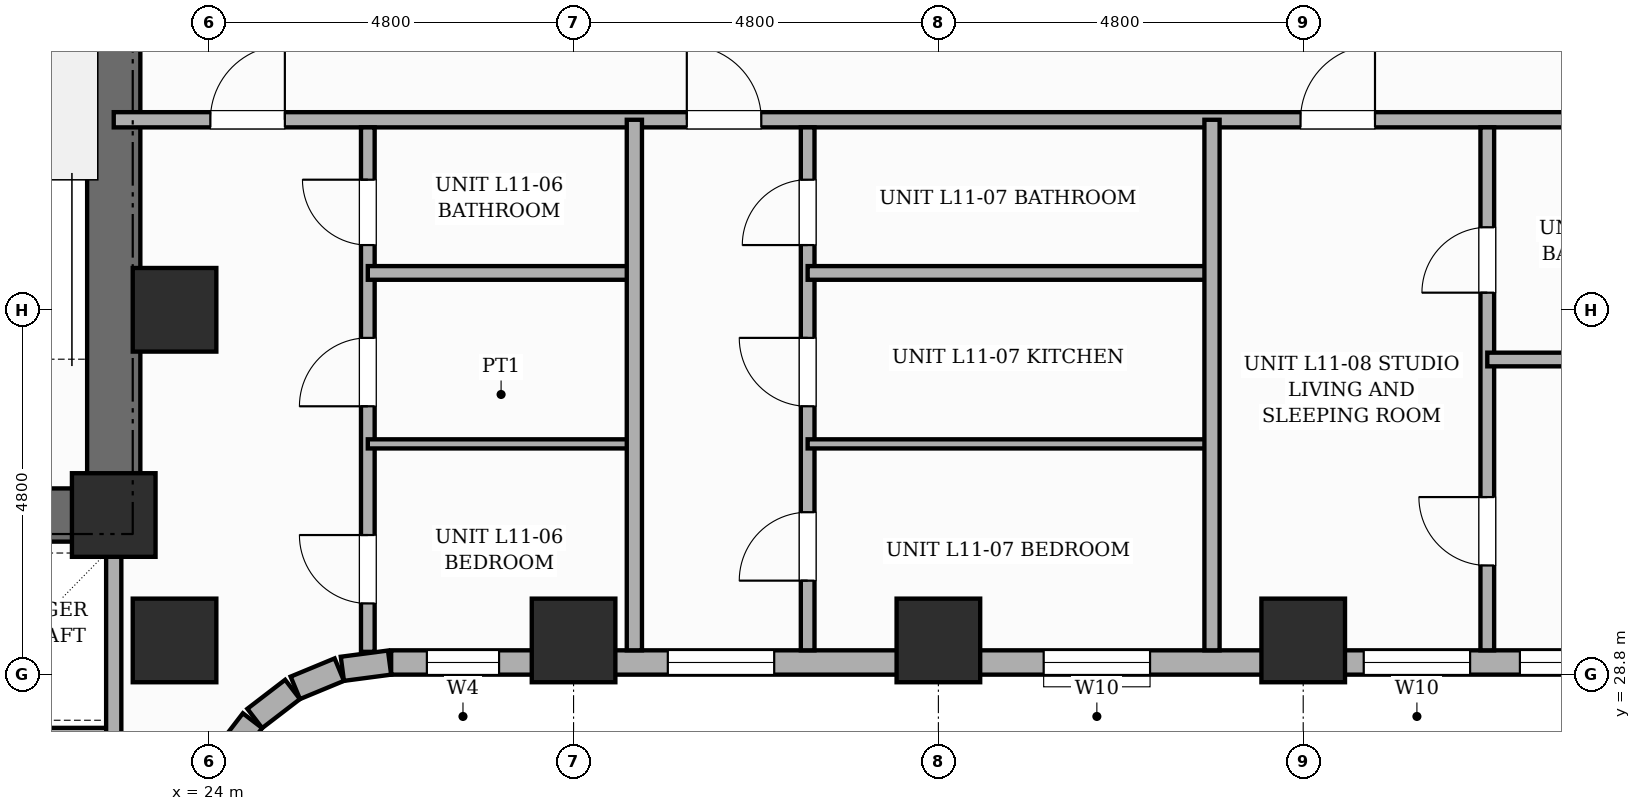
"""IFC4 building model, lengths in metres.
Left out: names, types, materials, properties, quantities, classifications, styles, units other than length and angle.
Written with IfcOpenShell. Run it as: python <this file> out.ifc"""

import sys

from ifc_helpers import new_model, si_unit, direction, frame, frame_2d, origin, origin_2d, place, context, subcontext, project, spatial, rectangle, extrude, element, fill, save


model = new_model("IFC4")
c1 = context("Model", 3, precision=1e-05, world=origin(), true_north=direction((0.0, 1.0)))
c2 = subcontext(c1, "Body", "Model", "MODEL_VIEW")
j1 = project(units=[si_unit("LENGTHUNIT", "METRE"), si_unit("PLANEANGLEUNIT", "RADIAN")], contexts=[c1])
p1 = place(None, origin())
s1 = spatial("IfcSite", under=j1, at=p1, CompositionType="ELEMENT")
p2 = place(p1, origin())
s2 = spatial("IfcBuilding", under=s1, at=p2, CompositionType="ELEMENT")
p3 = place(p2, frame((0.0, 0.0, 46.6)))
s3 = spatial("IfcBuildingStorey", under=s2, at=p3, CompositionType="ELEMENT", Elevation=46.6)
p4 = place(p3, frame((22.75, 30.55, 0.0), z_axis=(0.0, 0.0, 1.0), x_axis=(0.0, 1.0, 0.0)))
e1 = element("IfcWall", 1, at=p4, inside=s3, PredefinedType="SHEAR", context=c2, shape_type="SweptSolid", body=[
    extrude(rectangle(XDim=15.6, YDim=0.7, at=frame_2d((7.8, 0.0))), origin(), (0.0, 0.0, 1.0), 3.6),
])
p5 = place(p4, frame((10.8, 0.0, 0.0)))
e2 = element("IfcOpeningElement", 2, at=p5, cuts=e1, PredefinedType="OPENING", context=c2, shape_type="SweptSolid", body=[
    extrude(rectangle(XDim=1.0, YDim=2.15, at=frame_2d((0.5, 1.075))), frame((0.0, 0.36, 0.0), z_axis=(0.0, -1.0, 0.0), x_axis=(1.0, 0.0, 0.0)), (0.0, 0.0, 1.0), 0.72),
])
p6 = place(p3, frame((18.84, 30.9, 0.0), z_axis=(0.0, 0.0, 1.0), x_axis=(1.0, 0.0, 0.0)))
e3 = element("IfcWall", 3, at=p6, inside=s3, PredefinedType="SHEAR", context=c2, shape_type="SweptSolid", body=[
    extrude(rectangle(XDim=3.91, YDim=0.7, at=frame_2d((1.955, 0.0))), origin(), (0.0, 0.0, 1.0), 3.6),
])
for number, where, z_axis, x_axis in (
    (4, (22.75, 30.9, 0.0), (0.0, 0.0, 1.0), (1.0, 0.0, 0.0)),
    (5, (23.55, 29.25, 0.0), (0.0, 0.0, 1.0), (1.0, 0.0, 0.0)),
    (6, (23.55, 33.6, 0.0), (0.0, 0.0, 1.0), (1.0, 0.0, 0.0)),
    (7, (28.8, 29.25, 0.0), (0.0, 0.0, 1.0), (1.0, 0.0, 0.0)),
    (8, (33.6, 29.25, 0.0), (0.0, 0.0, 1.0), (1.0, 0.0, 0.0)),
    (9, (38.4, 29.25, 0.0), (0.0, 0.0, 1.0), (1.0, 0.0, 0.0)),
):
    element("IfcColumn", number, at=place(p3, frame(where, z_axis=z_axis, x_axis=x_axis)), inside=s3, PredefinedType="COLUMN", context=c2, shape_type="SweptSolid", body=[
        extrude(rectangle(XDim=1.1, YDim=1.1, at=origin_2d()), origin(), (0.0, 0.0, 1.0), 3.6),
    ])
p7 = place(p3, frame((55.2, 28.96, 0.0), z_axis=(0.0, 0.0, 1.0), x_axis=(-1.0, 0.0, 0.0)))
e10 = element("IfcWall", 10, at=p7, inside=s3, PredefinedType="STANDARD", context=c2, shape_type="SweptSolid", body=[
    extrude(rectangle(XDim=28.8, YDim=0.32, at=frame_2d((14.4, 0.0))), origin(), (0.0, 0.0, 1.0), 2.53),
])
p8 = place(p7, frame((27.38, 0.0, 0.45)))
e11 = element("IfcOpeningElement", 11, at=p8, cuts=e10, PredefinedType="OPENING", context=c2, shape_type="SweptSolid", body=[
    extrude(rectangle(XDim=0.95, YDim=1.8, at=frame_2d((0.475, 0.9))), frame((0.0, 0.17, 0.0), z_axis=(0.0, -1.0, 0.0), x_axis=(1.0, 0.0, 0.0)), (0.0, 0.0, 1.0), 0.34),
])
p9 = place(p7, frame((18.815, 0.0, 0.65)))
e12 = element("IfcOpeningElement", 12, at=p9, cuts=e10, PredefinedType="OPENING", context=c2, shape_type="SweptSolid", body=[
    extrude(rectangle(XDim=1.4, YDim=1.1, at=frame_2d((0.7, 0.55))), frame((0.0, 0.17, 0.0), z_axis=(0.0, -1.0, 0.0), x_axis=(1.0, 0.0, 0.0)), (0.0, 0.0, 1.0), 0.34),
])
p10 = place(p7, frame((14.604, 0.0, 0.65)))
e13 = element("IfcOpeningElement", 13, at=p10, cuts=e10, PredefinedType="OPENING", context=c2, shape_type="SweptSolid", body=[
    extrude(rectangle(XDim=1.4, YDim=1.1, at=frame_2d((0.7, 0.55))), frame((0.0, 0.17, 0.0), z_axis=(0.0, -1.0, 0.0), x_axis=(1.0, 0.0, 0.0)), (0.0, 0.0, 1.0), 0.34),
])
p11 = place(p7, frame((4.79, 0.0, 0.65)))
e14 = element("IfcOpeningElement", 14, at=p11, cuts=e10, PredefinedType="OPENING", context=c2, shape_type="SweptSolid", body=[
    extrude(rectangle(XDim=1.4, YDim=1.1, at=frame_2d((0.7, 0.55))), frame((0.0, 0.17, 0.0), z_axis=(0.0, -1.0, 0.0), x_axis=(1.0, 0.0, 0.0)), (0.0, 0.0, 1.0), 0.34),
])
p12 = place(p7, frame((0.47, 0.0, 0.65)))
e15 = element("IfcOpeningElement", 15, at=p12, cuts=e10, PredefinedType="OPENING", context=c2, shape_type="SweptSolid", body=[
    extrude(rectangle(XDim=1.4, YDim=1.1, at=frame_2d((0.7, 0.55))), frame((0.0, 0.17, 0.0), z_axis=(0.0, -1.0, 0.0), x_axis=(1.0, 0.0, 0.0)), (0.0, 0.0, 1.0), 0.34),
])
p13 = place(p7, frame((23.76, 0.0, 0.65)))
e16 = element("IfcOpeningElement", 16, at=p13, cuts=e10, PredefinedType="OPENING", context=c2, shape_type="SweptSolid", body=[
    extrude(rectangle(XDim=1.4, YDim=1.1, at=frame_2d((0.7, 0.55))), frame((0.0, 0.17, 0.0), z_axis=(0.0, -1.0, 0.0), x_axis=(1.0, 0.0, 0.0)), (0.0, 0.0, 1.0), 0.34),
])
p14 = place(p7, frame((12.999, 0.0, 0.45)))
e17 = element("IfcOpeningElement", 17, at=p14, cuts=e10, PredefinedType="OPENING", context=c2, shape_type="SweptSolid", body=[
    extrude(rectangle(XDim=0.95, YDim=1.8, at=frame_2d((0.475, 0.9))), frame((0.0, 0.17, 0.0), z_axis=(0.0, -1.0, 0.0), x_axis=(1.0, 0.0, 0.0)), (0.0, 0.0, 1.0), 0.34),
])
p15 = place(p3, frame((26.379, 28.958, 0.0), z_axis=(0.0, 0.0, 1.0), x_axis=(-0.991447664465, -0.130504898859, 0.0)))
e18 = element("IfcWall", 18, at=p15, inside=s3, PredefinedType="STANDARD", context=c2, shape_type="SweptSolid", body=[
    extrude(rectangle(XDim=0.627, YDim=0.32, at=frame_2d((0.313, 0.0))), origin(), (0.0, 0.0, 1.0), 2.53),
])
p16 = place(p3, frame((25.718, 28.866, 0.0), z_axis=(0.0, 0.0, 1.0), x_axis=(-0.923836271867, -0.382787856107, 0.0)))
e19 = element("IfcWall", 19, at=p16, inside=s3, PredefinedType="STANDARD", context=c2, shape_type="SweptSolid", body=[
    extrude(rectangle(XDim=0.626, YDim=0.32, at=frame_2d((0.313, 0.0))), origin(), (0.0, 0.0, 1.0), 3.35),
])
for number, where, z_axis, x_axis in (
    (20, (25.103, 28.605, 0.0), (0.0, 0.0, 1.0), (-0.793, -0.609, 0.0)),
    (21, (24.576, 28.195, 0.0), (0.0, 0.0, 1.0), (-0.609, -0.793, 0.0)),
):
    element("IfcWall", number, at=place(p3, frame(where, z_axis=z_axis, x_axis=x_axis)), inside=s3, PredefinedType="STANDARD", context=c2, shape_type="SweptSolid", body=[
        extrude(rectangle(XDim=0.626, YDim=0.32, at=frame_2d((0.313, 0.0))), origin(), (0.0, 0.0, 1.0), 3.35),
    ])
p17 = place(p3, frame((15.5, 28.0, 0.0), z_axis=(0.0, 0.0, 1.0), x_axis=(1.0, 0.0, 0.0)))
e22 = element("IfcWall", 22, at=p17, inside=s3, PredefinedType="POLYGONAL", context=c2, shape_type="SweptSolid", body=[
    extrude(rectangle(XDim=7.25, YDim=0.2, at=frame_2d((3.625, 0.0))), origin(), (0.0, 0.0, 1.0), 3.35),
])
p18 = place(p3, frame((22.75, 27.9, 0.0), z_axis=(0.0, 0.0, 1.0), x_axis=(0.0, 1.0, 0.0)))
e23 = element("IfcWall", 23, at=p18, inside=s3, PredefinedType="POLYGONAL", context=c2, shape_type="SweptSolid", body=[
    extrude(rectangle(XDim=3.0, YDim=0.2, at=frame_2d((1.5, 0.0))), origin(), (0.0, 0.0, 1.0), 3.35),
])
p19 = place(p3, frame((22.75, 36.1, 0.0), z_axis=(0.0, 0.0, 1.0), x_axis=(1.0, 0.0, 0.0)))
e24 = element("IfcWall", 24, at=p19, inside=s3, PredefinedType="PARTITIONING", context=c2, shape_type="SweptSolid", body=[
    extrude(rectangle(XDim=21.27, YDim=0.2, at=frame_2d((10.635, 0.0))), origin(), (0.0, 0.0, 1.0), 3.35),
])
p20 = place(p19, frame((1.271, 0.0, 0.0)))
e25 = element("IfcOpeningElement", 25, at=p20, cuts=e24, PredefinedType="OPENING", context=c2, shape_type="SweptSolid", body=[
    extrude(rectangle(XDim=0.98, YDim=2.18, at=frame_2d((0.49, 1.09))), frame((0.0, 0.11, 0.0), z_axis=(0.0, -1.0, 0.0), x_axis=(1.0, 0.0, 0.0)), (0.0, 0.0, 1.0), 0.22),
])
p21 = place(p19, frame((7.54, 0.0, 0.0)))
e26 = element("IfcOpeningElement", 26, at=p21, cuts=e24, PredefinedType="OPENING", context=c2, shape_type="SweptSolid", body=[
    extrude(rectangle(XDim=0.98, YDim=2.18, at=frame_2d((0.49, 1.09))), frame((0.0, 0.11, 0.0), z_axis=(0.0, -1.0, 0.0), x_axis=(1.0, 0.0, 0.0)), (0.0, 0.0, 1.0), 0.22),
])
p22 = place(p19, frame((15.615, 0.0, 0.0)))
e27 = element("IfcOpeningElement", 27, at=p22, cuts=e24, PredefinedType="OPENING", context=c2, shape_type="SweptSolid", body=[
    extrude(rectangle(XDim=0.98, YDim=2.18, at=frame_2d((0.49, 1.09))), frame((0.0, 0.11, 0.0), z_axis=(0.0, -1.0, 0.0), x_axis=(1.0, 0.0, 0.0)), (0.0, 0.0, 1.0), 0.22),
])
p23 = place(p3, frame((26.093, 29.1, 0.0), z_axis=(0.0, 0.0, 1.0), x_axis=(0.0, 1.0, 0.0)))
e28 = element("IfcWall", 28, at=p23, inside=s3, PredefinedType="PLUMBINGWALL", context=c2, shape_type="SweptSolid", body=[
    extrude(rectangle(XDim=6.9, YDim=0.18, at=frame_2d((3.45, 0.0))), origin(), (0.0, 0.0, 1.0), 3.35),
])
p24 = place(p23, frame((0.637, 0.0, 0.0)))
e29 = element("IfcOpeningElement", 29, at=p24, cuts=e28, PredefinedType="OPENING", context=c2, shape_type="SweptSolid", body=[
    extrude(rectangle(XDim=0.9, YDim=2.15, at=frame_2d((0.45, 1.075))), frame((0.0, 0.1, 0.0), z_axis=(0.0, -1.0, 0.0), x_axis=(1.0, 0.0, 0.0)), (0.0, 0.0, 1.0), 0.2),
])
p25 = place(p23, frame((3.23, 0.0, 0.0)))
e30 = element("IfcOpeningElement", 30, at=p25, cuts=e28, PredefinedType="OPENING", context=c2, shape_type="SweptSolid", body=[
    extrude(rectangle(XDim=0.9, YDim=2.15, at=frame_2d((0.45, 1.075))), frame((0.0, 0.1, 0.0), z_axis=(0.0, -1.0, 0.0), x_axis=(1.0, 0.0, 0.0)), (0.0, 0.0, 1.0), 0.2),
])
p26 = place(p23, frame((5.352, 0.0, 0.0)))
e31 = element("IfcOpeningElement", 31, at=p26, cuts=e28, PredefinedType="OPENING", context=c2, shape_type="SweptSolid", body=[
    extrude(rectangle(XDim=0.86, YDim=2.1, at=frame_2d((0.43, 1.05))), frame((0.0, 0.1, 0.0), z_axis=(0.0, -1.0, 0.0), x_axis=(1.0, 0.0, 0.0)), (0.0, 0.0, 1.0), 0.2),
])
p27 = place(p3, frame((26.093, 31.836, 0.0), z_axis=(0.0, 0.0, 1.0), x_axis=(1.0, 0.0, 0.0)))
e32 = element("IfcWall", 32, at=p27, inside=s3, PredefinedType="PARTITIONING", context=c2, shape_type="SweptSolid", body=[
    extrude(rectangle(XDim=3.507, YDim=0.12, at=frame_2d((1.753, 0.0))), origin(), (0.0, 0.0, 1.0), 3.35),
])
p28 = place(p3, frame((26.093, 34.085, 0.0), z_axis=(0.0, 0.0, 1.0), x_axis=(1.0, 0.0, 0.0)))
e33 = element("IfcWall", 33, at=p28, inside=s3, PredefinedType="PLUMBINGWALL", context=c2, shape_type="SweptSolid", body=[
    extrude(rectangle(XDim=3.507, YDim=0.18, at=frame_2d((1.753, 0.0))), origin(), (0.0, 0.0, 1.0), 3.35),
])
p29 = place(p3, frame((29.6, 29.12, 0.0), z_axis=(0.0, 0.0, 1.0), x_axis=(0.0, 1.0, 0.0)))
e34 = element("IfcWall", 34, at=p29, inside=s3, PredefinedType="SOLIDWALL", context=c2, shape_type="SweptSolid", body=[
    extrude(rectangle(XDim=6.98, YDim=0.2, at=frame_2d((3.49, 0.0))), origin(), (0.0, 0.0, 1.0), 3.35),
])
p30 = place(p3, frame((31.88, 29.12, 0.0), z_axis=(0.0, 0.0, 1.0), x_axis=(0.0, 1.0, 0.0)))
e35 = element("IfcWall", 35, at=p30, inside=s3, PredefinedType="PLUMBINGWALL", context=c2, shape_type="SweptSolid", body=[
    extrude(rectangle(XDim=6.88, YDim=0.18, at=frame_2d((3.44, 0.0))), origin(), (0.0, 0.0, 1.0), 3.35),
])
p31 = place(p30, frame((0.917, 0.0, 0.0)))
e36 = element("IfcOpeningElement", 36, at=p31, cuts=e35, PredefinedType="OPENING", context=c2, shape_type="SweptSolid", body=[
    extrude(rectangle(XDim=0.9, YDim=2.15, at=frame_2d((0.45, 1.075))), frame((0.0, 0.1, 0.0), z_axis=(0.0, -1.0, 0.0), x_axis=(1.0, 0.0, 0.0)), (0.0, 0.0, 1.0), 0.2),
])
p32 = place(p30, frame((3.21, 0.0, 0.0)))
e37 = element("IfcOpeningElement", 37, at=p32, cuts=e35, PredefinedType="OPENING", context=c2, shape_type="SweptSolid", body=[
    extrude(rectangle(XDim=0.9, YDim=2.15, at=frame_2d((0.45, 1.075))), frame((0.0, 0.1, 0.0), z_axis=(0.0, -1.0, 0.0), x_axis=(1.0, 0.0, 0.0)), (0.0, 0.0, 1.0), 0.2),
])
p33 = place(p30, frame((5.332, 0.0, 0.0)))
e38 = element("IfcOpeningElement", 38, at=p33, cuts=e35, PredefinedType="OPENING", context=c2, shape_type="SweptSolid", body=[
    extrude(rectangle(XDim=0.86, YDim=2.1, at=frame_2d((0.43, 1.05))), frame((0.0, 0.1, 0.0), z_axis=(0.0, -1.0, 0.0), x_axis=(1.0, 0.0, 0.0)), (0.0, 0.0, 1.0), 0.2),
])
p34 = place(p3, frame((31.88, 31.836, 0.0), z_axis=(0.0, 0.0, 1.0), x_axis=(1.0, 0.0, 0.0)))
e39 = element("IfcWall", 39, at=p34, inside=s3, PredefinedType="PARTITIONING", context=c2, shape_type="SweptSolid", body=[
    extrude(rectangle(XDim=5.32, YDim=0.12, at=frame_2d((2.66, 0.0))), origin(), (0.0, 0.0, 1.0), 3.35),
])
p35 = place(p3, frame((31.88, 34.085, 0.0), z_axis=(0.0, 0.0, 1.0), x_axis=(1.0, 0.0, 0.0)))
e40 = element("IfcWall", 40, at=p35, inside=s3, PredefinedType="PLUMBINGWALL", context=c2, shape_type="SweptSolid", body=[
    extrude(rectangle(XDim=5.32, YDim=0.18, at=frame_2d((2.66, 0.0))), origin(), (0.0, 0.0, 1.0), 3.35),
])
p36 = place(p3, frame((37.2, 29.12, 0.0), z_axis=(0.0, 0.0, 1.0), x_axis=(0.0, 1.0, 0.0)))
e41 = element("IfcWall", 41, at=p36, inside=s3, PredefinedType="SOLIDWALL", context=c2, shape_type="SweptSolid", body=[
    extrude(rectangle(XDim=6.98, YDim=0.2, at=frame_2d((3.49, 0.0))), origin(), (0.0, 0.0, 1.0), 3.35),
])
p37 = place(p3, frame((40.822, 29.12, 0.0), z_axis=(0.0, 0.0, 1.0), x_axis=(0.0, 1.0, 0.0)))
e42 = element("IfcWall", 42, at=p37, inside=s3, PredefinedType="PLUMBINGWALL", context=c2, shape_type="SweptSolid", body=[
    extrude(rectangle(XDim=6.88, YDim=0.18, at=frame_2d((3.44, 0.0))), origin(), (0.0, 0.0, 1.0), 3.35),
])
p38 = place(p37, frame((1.116, 0.0, 0.0)))
e43 = element("IfcOpeningElement", 43, at=p38, cuts=e42, PredefinedType="OPENING", context=c2, shape_type="SweptSolid", body=[
    extrude(rectangle(XDim=0.9, YDim=2.15, at=frame_2d((0.45, 1.075))), frame((0.0, 0.1, 0.0), z_axis=(0.0, -1.0, 0.0), x_axis=(1.0, 0.0, 0.0)), (0.0, 0.0, 1.0), 0.2),
])
p39 = place(p37, frame((4.705, 0.0, 0.0)))
e44 = element("IfcOpeningElement", 44, at=p39, cuts=e42, PredefinedType="OPENING", context=c2, shape_type="SweptSolid", body=[
    extrude(rectangle(XDim=0.86, YDim=2.1, at=frame_2d((0.43, 1.05))), frame((0.0, 0.1, 0.0), z_axis=(0.0, -1.0, 0.0), x_axis=(1.0, 0.0, 0.0)), (0.0, 0.0, 1.0), 0.2),
])
p40 = place(p3, frame((40.822, 32.946, 0.0), z_axis=(0.0, 0.0, 1.0), x_axis=(1.0, 0.0, 0.0)))
e45 = element("IfcWall", 45, at=p40, inside=s3, PredefinedType="PLUMBINGWALL", context=c2, shape_type="SweptSolid", body=[
    extrude(rectangle(XDim=3.098, YDim=0.18, at=frame_2d((1.549, 0.0))), origin(), (0.0, 0.0, 1.0), 3.35),
])
p41 = place(p8, origin())
e46 = element("IfcWindow", 46, at=p41, inside=s3, PartitioningType="SINGLE_PANEL", PredefinedType="WINDOW", context=c2, shape_type="SweptSolid", body=[
    extrude(rectangle(XDim=0.95, YDim=1.8, at=frame_2d((0.475, 0.9))), frame((0.0, 0.03, 0.0), z_axis=(0.0, -1.0, 0.0), x_axis=(1.0, 0.0, 0.0)), (0.0, 0.0, 1.0), 0.06),
])
fill(e11, e46)
p42 = place(p9, origin())
e47 = element("IfcWindow", 47, at=p42, inside=s3, PartitioningType="SINGLE_PANEL", PredefinedType="WINDOW", context=c2, shape_type="SweptSolid", body=[
    extrude(rectangle(XDim=1.4, YDim=1.1, at=frame_2d((0.7, 0.55))), frame((0.0, 0.03, 0.0), z_axis=(0.0, -1.0, 0.0), x_axis=(1.0, 0.0, 0.0)), (0.0, 0.0, 1.0), 0.06),
])
fill(e12, e47)
p43 = place(p10, origin())
e48 = element("IfcWindow", 48, at=p43, inside=s3, PartitioningType="SINGLE_PANEL", PredefinedType="WINDOW", context=c2, shape_type="SweptSolid", body=[
    extrude(rectangle(XDim=1.4, YDim=1.1, at=frame_2d((0.7, 0.55))), frame((0.0, 0.03, 0.0), z_axis=(0.0, -1.0, 0.0), x_axis=(1.0, 0.0, 0.0)), (0.0, 0.0, 1.0), 0.06),
])
fill(e13, e48)
p44 = place(p13, origin())
e49 = element("IfcWindow", 49, at=p44, inside=s3, PartitioningType="SINGLE_PANEL", PredefinedType="WINDOW", context=c2, shape_type="SweptSolid", body=[
    extrude(rectangle(XDim=1.4, YDim=1.1, at=frame_2d((0.7, 0.55))), frame((0.0, 0.03, 0.0), z_axis=(0.0, -1.0, 0.0), x_axis=(1.0, 0.0, 0.0)), (0.0, 0.0, 1.0), 0.06),
])
fill(e16, e49)
p45 = place(p14, origin())
e50 = element("IfcWindow", 50, at=p45, inside=s3, PartitioningType="SINGLE_PANEL", PredefinedType="WINDOW", context=c2, shape_type="SweptSolid", body=[
    extrude(rectangle(XDim=0.95, YDim=1.8, at=frame_2d((0.475, 0.9))), frame((0.0, 0.03, 0.0), z_axis=(0.0, -1.0, 0.0), x_axis=(1.0, 0.0, 0.0)), (0.0, 0.0, 1.0), 0.06),
])
fill(e17, e50)
p46 = place(p20, origin())
e51 = element("IfcDoor", 51, at=p46, inside=s3, OperationType="SINGLE_SWING_RIGHT", PredefinedType="DOOR", context=c2, shape_type="SweptSolid", body=[
    extrude(rectangle(XDim=0.98, YDim=2.18, at=frame_2d((0.49, 1.09))), frame((0.0, 0.025, 0.0), z_axis=(0.0, -1.0, 0.0), x_axis=(1.0, 0.0, 0.0)), (0.0, 0.0, 1.0), 0.05),
])
fill(e25, e51)
p47 = place(p24, origin())
e52 = element("IfcDoor", 52, at=p47, inside=s3, OperationType="SINGLE_SWING_RIGHT", PredefinedType="DOOR", context=c2, shape_type="SweptSolid", body=[
    extrude(rectangle(XDim=0.9, YDim=2.15, at=frame_2d((0.45, 1.075))), frame((0.0, 0.025, 0.0), z_axis=(0.0, -1.0, 0.0), x_axis=(1.0, 0.0, 0.0)), (0.0, 0.0, 1.0), 0.05),
])
fill(e29, e52)
p48 = place(p25, origin())
e53 = element("IfcDoor", 53, at=p48, inside=s3, OperationType="SINGLE_SWING_LEFT", PredefinedType="DOOR", context=c2, shape_type="SweptSolid", body=[
    extrude(rectangle(XDim=0.9, YDim=2.15, at=frame_2d((0.45, 1.075))), frame((0.0, 0.025, 0.0), z_axis=(0.0, -1.0, 0.0), x_axis=(1.0, 0.0, 0.0)), (0.0, 0.0, 1.0), 0.05),
])
fill(e30, e53)
p49 = place(p26, origin())
e54 = element("IfcDoor", 54, at=p49, inside=s3, OperationType="SINGLE_SWING_RIGHT", PredefinedType="DOOR", context=c2, shape_type="SweptSolid", body=[
    extrude(rectangle(XDim=0.86, YDim=2.1, at=frame_2d((0.43, 1.05))), frame((0.0, 0.025, 0.0), z_axis=(0.0, -1.0, 0.0), x_axis=(1.0, 0.0, 0.0)), (0.0, 0.0, 1.0), 0.05),
])
fill(e31, e54)
p50 = place(p21, origin())
e55 = element("IfcDoor", 55, at=p50, inside=s3, OperationType="SINGLE_SWING_LEFT", PredefinedType="DOOR", context=c2, shape_type="SweptSolid", body=[
    extrude(rectangle(XDim=0.98, YDim=2.18, at=frame_2d((0.49, 1.09))), frame((0.0, 0.025, 0.0), z_axis=(0.0, -1.0, 0.0), x_axis=(1.0, 0.0, 0.0)), (0.0, 0.0, 1.0), 0.05),
])
fill(e26, e55)
p51 = place(p31, origin())
e56 = element("IfcDoor", 56, at=p51, inside=s3, OperationType="SINGLE_SWING_LEFT", PredefinedType="DOOR", context=c2, shape_type="SweptSolid", body=[
    extrude(rectangle(XDim=0.9, YDim=2.15, at=frame_2d((0.45, 1.075))), frame((0.0, 0.025, 0.0), z_axis=(0.0, -1.0, 0.0), x_axis=(1.0, 0.0, 0.0)), (0.0, 0.0, 1.0), 0.05),
])
fill(e36, e56)
p52 = place(p32, origin())
e57 = element("IfcDoor", 57, at=p52, inside=s3, OperationType="SINGLE_SWING_RIGHT", PredefinedType="DOOR", context=c2, shape_type="SweptSolid", body=[
    extrude(rectangle(XDim=0.9, YDim=2.15, at=frame_2d((0.45, 1.075))), frame((0.0, 0.025, 0.0), z_axis=(0.0, -1.0, 0.0), x_axis=(1.0, 0.0, 0.0)), (0.0, 0.0, 1.0), 0.05),
])
fill(e37, e57)
p53 = place(p33, origin())
e58 = element("IfcDoor", 58, at=p53, inside=s3, OperationType="SINGLE_SWING_LEFT", PredefinedType="DOOR", context=c2, shape_type="SweptSolid", body=[
    extrude(rectangle(XDim=0.86, YDim=2.1, at=frame_2d((0.43, 1.05))), frame((0.0, 0.025, 0.0), z_axis=(0.0, -1.0, 0.0), x_axis=(1.0, 0.0, 0.0)), (0.0, 0.0, 1.0), 0.05),
])
fill(e38, e58)
p54 = place(p22, origin())
e59 = element("IfcDoor", 59, at=p54, inside=s3, OperationType="SINGLE_SWING_RIGHT", PredefinedType="DOOR", context=c2, shape_type="SweptSolid", body=[
    extrude(rectangle(XDim=0.98, YDim=2.18, at=frame_2d((0.49, 1.09))), frame((0.0, 0.025, 0.0), z_axis=(0.0, -1.0, 0.0), x_axis=(1.0, 0.0, 0.0)), (0.0, 0.0, 1.0), 0.05),
])
fill(e27, e59)
p55 = place(p38, origin())
e60 = element("IfcDoor", 60, at=p55, inside=s3, OperationType="SINGLE_SWING_RIGHT", PredefinedType="DOOR", context=c2, shape_type="SweptSolid", body=[
    extrude(rectangle(XDim=0.9, YDim=2.15, at=frame_2d((0.45, 1.075))), frame((0.0, 0.025, 0.0), z_axis=(0.0, -1.0, 0.0), x_axis=(1.0, 0.0, 0.0)), (0.0, 0.0, 1.0), 0.05),
])
fill(e43, e60)
p56 = place(p39, origin())
e61 = element("IfcDoor", 61, at=p56, inside=s3, OperationType="SINGLE_SWING_LEFT", PredefinedType="DOOR", context=c2, shape_type="SweptSolid", body=[
    extrude(rectangle(XDim=0.86, YDim=2.1, at=frame_2d((0.43, 1.05))), frame((0.0, 0.025, 0.0), z_axis=(0.0, -1.0, 0.0), x_axis=(1.0, 0.0, 0.0)), (0.0, 0.0, 1.0), 0.05),
])
fill(e44, e61)
save(model, sys.argv[1])
